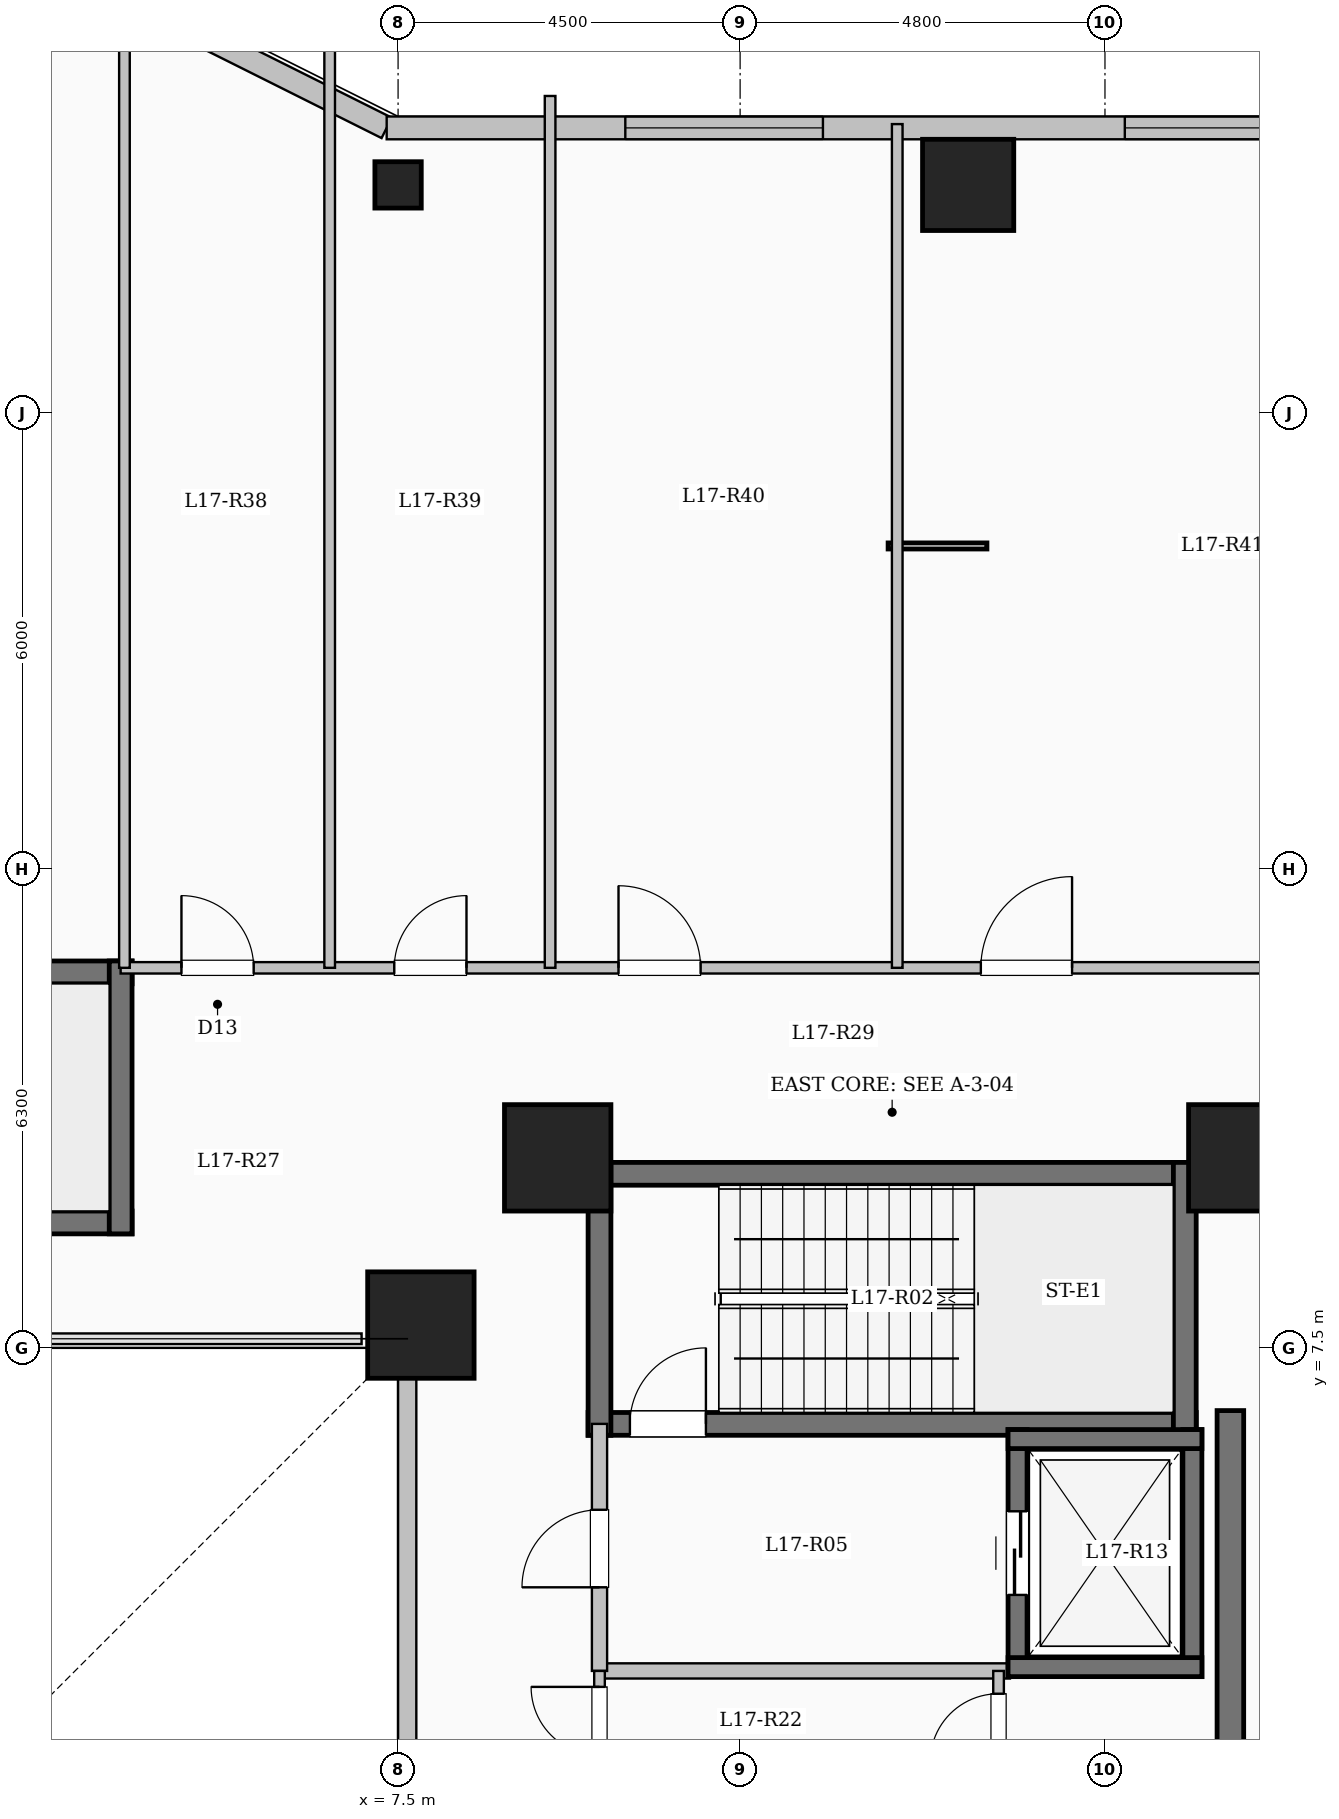
"""IFC4 building model, lengths in metres.
Left out: names, types, materials, properties, quantities, classifications, styles, units other than length and angle.
Written with IfcOpenShell. Run it as: python <this file> out.ifc"""

import sys

from ifc_helpers import new_model, si_unit, direction, frame, frame_2d, origin, origin_2d, place, context, subcontext, project, spatial, rectangle, hollow_circle, extrude, element, fill, save


model = new_model("IFC4")
c1 = context("Model", 3, precision=1e-05, world=origin(), true_north=direction((0.0, 1.0)))
c2 = subcontext(c1, "Body", "Model", "MODEL_VIEW")
j1 = project(units=[si_unit("LENGTHUNIT", "METRE"), si_unit("PLANEANGLEUNIT", "RADIAN")], contexts=[c1])
p1 = place(None, origin())
s1 = spatial("IfcSite", under=j1, at=p1, CompositionType="ELEMENT")
p2 = place(p1, origin())
s2 = spatial("IfcBuilding", under=s1, at=p2, CompositionType="ELEMENT")
p3 = place(p2, frame((0.0, 0.0, 64.2)))
s3 = spatial("IfcBuildingStorey", under=s2, at=p3, CompositionType="ELEMENT", Elevation=64.2)
for number, where, z_axis, x_axis in (
    (1, (7.8, 7.8, 0.0), (0.0, 0.0, 1.0), (1.0, 0.0, 0.0)),
    (2, (9.6, 10.0, 0.0), (0.0, 0.0, 1.0), (1.0, 0.0, 0.0)),
    (3, (18.6, 10.0, 0.0), (0.0, 0.0, 1.0), (1.0, 0.0, 0.0)),
):
    element("IfcColumn", number, at=place(p3, frame(where, z_axis=z_axis, x_axis=x_axis)), inside=s3, PredefinedType="COLUMN", context=c2, shape_type="SweptSolid", body=[
        extrude(rectangle(XDim=1.4, YDim=1.4, at=origin_2d()), origin(), (0.0, 0.0, 1.0), 4.5),
    ])
p4 = place(p3, frame((7.5, 22.8, 0.0), z_axis=(0.0, 0.0, 1.0), x_axis=(1.0, 0.0, 0.0)))
e4 = element("IfcColumn", 4, at=p4, inside=s3, PredefinedType="COLUMN", context=c2, shape_type="SweptSolid", body=[
    extrude(hollow_circle(Radius=0.305, WallThickness=0.025, at=origin_2d()), origin(), (0.0, 0.0, 1.0), 4.5),
])
p5 = place(p3, frame((15.0, 22.8, 0.0), z_axis=(0.0, 0.0, 1.0), x_axis=(1.0, 0.0, 0.0)))
e5 = element("IfcColumn", 5, at=p5, inside=s3, PredefinedType="COLUMN", context=c2, shape_type="SweptSolid", body=[
    extrude(rectangle(XDim=1.2, YDim=1.2, at=origin_2d()), origin(), (0.0, 0.0, 1.0), 4.5),
])
p6 = place(p3, frame((7.62, -7.62, 0.0), z_axis=(0.0, 0.0, 1.0), x_axis=(0.0, 1.0, 0.0)))
e6 = element("IfcWall", 6, at=p6, inside=s3, PredefinedType="SOLIDWALL", context=c2, shape_type="SweptSolid", body=[
    extrude(rectangle(XDim=15.24, YDim=0.24, at=frame_2d((7.62, 0.0))), origin(), (0.0, 0.0, 1.0), 4.2),
])
p7 = place(p6, frame((6.92, 0.0, 0.95)))
e7 = element("IfcOpeningElement", 7, at=p7, cuts=e6, PredefinedType="OPENING", context=c2, shape_type="SweptSolid", body=[
    extrude(rectangle(XDim=1.4, YDim=1.5, at=frame_2d((0.7, 0.75))), frame((0.0, 0.13, 0.0), z_axis=(0.0, -1.0, 0.0), x_axis=(1.0, 0.0, 0.0)), (0.0, 0.0, 1.0), 0.26),
])
p8 = place(p3, frame((4.35, 25.05, 0.0), z_axis=(0.0, 0.0, 1.0), x_axis=(0.894427191, -0.4472135955, 0.0)))
e8 = element("IfcWall", 8, at=p8, inside=s3, PredefinedType="SOLIDWALL", context=c2, shape_type="SweptSolid", body=[
    extrude(rectangle(XDim=3.354, YDim=0.3, at=frame_2d((1.677, 0.0))), origin(), (0.0, 0.0, 1.0), 4.2),
])
p9 = place(p3, frame((7.35, 23.55, 0.0), z_axis=(0.0, 0.0, 1.0), x_axis=(1.0, 0.0, 0.0)))
e9 = element("IfcWall", 9, at=p9, inside=s3, PredefinedType="SOLIDWALL", context=c2, shape_type="SweptSolid", body=[
    extrude(rectangle(XDim=15.3, YDim=0.3, at=frame_2d((7.65, 0.0))), origin(), (0.0, 0.0, 1.0), 4.2),
])
p10 = place(p9, frame((3.139, 0.0, 0.85)))
e10 = element("IfcOpeningElement", 10, at=p10, cuts=e9, PredefinedType="OPENING", context=c2, shape_type="SweptSolid", body=[
    extrude(rectangle(XDim=2.6, YDim=2.4, at=frame_2d((1.3, 1.2))), frame((0.0, 0.16, 0.0), z_axis=(0.0, -1.0, 0.0), x_axis=(1.0, 0.0, 0.0)), (0.0, 0.0, 1.0), 0.32),
])
p11 = place(p9, frame((9.711, 0.0, 0.85)))
e11 = element("IfcOpeningElement", 11, at=p11, cuts=e9, PredefinedType="OPENING", context=c2, shape_type="SweptSolid", body=[
    extrude(rectangle(XDim=2.6, YDim=2.4, at=frame_2d((1.3, 1.2))), frame((0.0, 0.16, 0.0), z_axis=(0.0, -1.0, 0.0), x_axis=(1.0, 0.0, 0.0)), (0.0, 0.0, 1.0), 0.32),
])
p12 = place(p3, frame((10.0, 9.79, 0.0), z_axis=(0.0, 0.0, 1.0), x_axis=(1.0, 0.0, 0.0)))
e12 = element("IfcWall", 12, at=p12, inside=s3, PredefinedType="SHEAR", context=c2, shape_type="SweptSolid", body=[
    extrude(rectangle(XDim=8.0, YDim=0.3, at=frame_2d((4.0, 0.0))), origin(), (0.0, 0.0, 1.0), 4.5),
])
p13 = place(p3, frame((10.0, 6.5, 0.0), z_axis=(0.0, 0.0, 1.0), x_axis=(1.0, 0.0, 0.0)))
e13 = element("IfcWall", 13, at=p13, inside=s3, PredefinedType="SHEAR", context=c2, shape_type="SweptSolid", body=[
    extrude(rectangle(XDim=8.0, YDim=0.3, at=frame_2d((4.0, 0.0))), origin(), (0.0, 0.0, 1.0), 4.5),
])
p14 = place(p13, frame((0.55, 0.0, 0.0)))
e14 = element("IfcOpeningElement", 14, at=p14, cuts=e13, PredefinedType="OPENING", context=c2, shape_type="SweptSolid", body=[
    extrude(rectangle(XDim=1.0, YDim=2.15, at=frame_2d((0.5, 1.075))), frame((0.0, 0.16, 0.0), z_axis=(0.0, -1.0, 0.0), x_axis=(1.0, 0.0, 0.0)), (0.0, 0.0, 1.0), 0.32),
])
for number, where, z_axis, x_axis in (
    (15, (10.15, 6.35, 0.0), (0.0, 0.0, 1.0), (0.0, 1.0, 0.0)),
    (16, (17.85, 6.35, 0.0), (0.0, 0.0, 1.0), (0.0, 1.0, 0.0)),
):
    element("IfcWall", number, at=place(p3, frame(where, z_axis=z_axis, x_axis=x_axis)), inside=s3, PredefinedType="SHEAR", context=c2, shape_type="SweptSolid", body=[
        extrude(rectangle(XDim=3.59, YDim=0.3, at=frame_2d((1.795, 0.0))), origin(), (0.0, 0.0, 1.0), 4.5),
    ])
p15 = place(p3, frame((-4.0, 12.44, 0.0), z_axis=(0.0, 0.0, 1.0), x_axis=(1.0, 0.0, 0.0)))
e17 = element("IfcWall", 17, at=p15, inside=s3, PredefinedType="SHEAR", context=c2, shape_type="SweptSolid", body=[
    extrude(rectangle(XDim=8.0, YDim=0.3, at=frame_2d((4.0, 0.0))), origin(), (0.0, 0.0, 1.0), 4.5),
])
p16 = place(p3, frame((-4.0, 9.15, 0.0), z_axis=(0.0, 0.0, 1.0), x_axis=(1.0, 0.0, 0.0)))
e18 = element("IfcWall", 18, at=p16, inside=s3, PredefinedType="SHEAR", context=c2, shape_type="SweptSolid", body=[
    extrude(rectangle(XDim=8.0, YDim=0.3, at=frame_2d((4.0, 0.0))), origin(), (0.0, 0.0, 1.0), 4.5),
])
p17 = place(p16, frame((0.55, 0.0, 0.0)))
e19 = element("IfcOpeningElement", 19, at=p17, cuts=e18, PredefinedType="OPENING", context=c2, shape_type="SweptSolid", body=[
    extrude(rectangle(XDim=1.0, YDim=2.15, at=frame_2d((0.5, 1.075))), frame((0.0, 0.16, 0.0), z_axis=(0.0, -1.0, 0.0), x_axis=(1.0, 0.0, 0.0)), (0.0, 0.0, 1.0), 0.32),
])
p18 = place(p3, frame((3.85, 9.0, 0.0), z_axis=(0.0, 0.0, 1.0), x_axis=(0.0, 1.0, 0.0)))
e20 = element("IfcWall", 20, at=p18, inside=s3, PredefinedType="SHEAR", context=c2, shape_type="SweptSolid", body=[
    extrude(rectangle(XDim=3.59, YDim=0.3, at=frame_2d((1.795, 0.0))), origin(), (0.0, 0.0, 1.0), 4.5),
])
p19 = place(p3, frame((10.15, 3.25, 0.0), z_axis=(0.0, 0.0, 1.0), x_axis=(1.0, 0.0, 0.0)))
e21 = element("IfcWall", 21, at=p19, inside=s3, PredefinedType="SOLIDWALL", context=c2, shape_type="SweptSolid", body=[
    extrude(rectangle(XDim=5.4, YDim=0.2, at=frame_2d((2.7, 0.0))), origin(), (0.0, 0.0, 1.0), 4.2),
])
p20 = place(p3, frame((10.15, 3.25, 0.0), z_axis=(0.0, 0.0, 1.0), x_axis=(0.0, 1.0, 0.0)))
e22 = element("IfcWall", 22, at=p20, inside=s3, PredefinedType="SOLIDWALL", context=c2, shape_type="SweptSolid", body=[
    extrude(rectangle(XDim=3.25, YDim=0.2, at=frame_2d((1.625, 0.0))), origin(), (0.0, 0.0, 1.0), 4.2),
])
p21 = place(p20, frame((1.1, 0.0, 0.0)))
e23 = element("IfcOpeningElement", 23, at=p21, cuts=e22, PredefinedType="OPENING", context=c2, shape_type="SweptSolid", body=[
    extrude(rectangle(XDim=1.02, YDim=2.15, at=frame_2d((0.51, 1.075))), frame((0.0, 0.11, 0.0), z_axis=(0.0, -1.0, 0.0), x_axis=(1.0, 0.0, 0.0)), (0.0, 0.0, 1.0), 0.22),
])
p22 = place(p3, frame((15.65, 3.175, 0.0), z_axis=(0.0, 0.0, 1.0), x_axis=(0.0, 1.0, 0.0)))
e24 = element("IfcWall", 24, at=p22, inside=s3, PredefinedType="SHEAR", context=c2, shape_type="SweptSolid", body=[
    extrude(rectangle(XDim=3.25, YDim=0.25, at=frame_2d((1.625, 0.0))), origin(), (0.0, 0.0, 1.0), 4.5),
])
p23 = place(p22, frame((1.075, 0.0, 0.0)))
e25 = element("IfcOpeningElement", 25, at=p23, cuts=e24, PredefinedType="OPENING", context=c2, shape_type="SweptSolid", body=[
    extrude(rectangle(XDim=1.1, YDim=2.15, at=frame_2d((0.55, 1.075))), frame((0.0, 0.135, 0.0), z_axis=(0.0, -1.0, 0.0), x_axis=(1.0, 0.0, 0.0)), (0.0, 0.0, 1.0), 0.27),
])
p24 = place(p3, frame((17.95, 3.175, 0.0), z_axis=(0.0, 0.0, 1.0), x_axis=(0.0, 1.0, 0.0)))
e26 = element("IfcWall", 26, at=p24, inside=s3, PredefinedType="SHEAR", context=c2, shape_type="SweptSolid", body=[
    extrude(rectangle(XDim=3.25, YDim=0.25, at=frame_2d((1.625, 0.0))), origin(), (0.0, 0.0, 1.0), 4.5),
])
for number, where, z_axis, x_axis in (
    (27, (15.525, 3.3, 0.0), (0.0, 0.0, 1.0), (1.0, 0.0, 0.0)),
    (28, (15.525, 6.3, 0.0), (0.0, 0.0, 1.0), (1.0, 0.0, 0.0)),
):
    element("IfcWall", number, at=place(p3, frame(where, z_axis=z_axis, x_axis=x_axis)), inside=s3, PredefinedType="SHEAR", context=c2, shape_type="SweptSolid", body=[
        extrude(rectangle(XDim=2.55, YDim=0.25, at=frame_2d((1.275, 0.0))), origin(), (0.0, 0.0, 1.0), 4.5),
    ])
p25 = place(p3, frame((18.45, -7.375, 0.0), z_axis=(0.0, 0.0, 1.0), x_axis=(0.0, 1.0, 0.0)))
e29 = element("IfcWall", 29, at=p25, inside=s3, PredefinedType="SHEAR", context=c2, shape_type="SweptSolid", body=[
    extrude(rectangle(XDim=14.05, YDim=0.35, at=frame_2d((7.025, 0.0))), origin(), (0.0, 0.0, 1.0), 4.5),
])
p26 = place(p3, frame((10.15, 1.92, 0.0), z_axis=(0.0, 0.0, 1.0), x_axis=(0.0, 1.0, 0.0)))
e30 = element("IfcWall", 30, at=p26, inside=s3, PredefinedType="PARTITIONING", context=c2, shape_type="SweptSolid", body=[
    extrude(rectangle(XDim=1.33, YDim=0.14, at=frame_2d((0.665, 0.0))), origin(), (0.0, 0.0, 1.0), 4.2),
])
p27 = place(p26, frame((0.22, 0.0, 0.0)))
e31 = element("IfcOpeningElement", 31, at=p27, cuts=e30, PredefinedType="OPENING", context=c2, shape_type="SweptSolid", body=[
    extrude(rectangle(XDim=0.9, YDim=2.08, at=frame_2d((0.45, 1.04))), frame((0.0, 0.08, 0.0), z_axis=(0.0, -1.0, 0.0), x_axis=(1.0, 0.0, 0.0)), (0.0, 0.0, 1.0), 0.16),
])
p28 = place(p3, frame((15.4, -7.2, 0.0), z_axis=(0.0, 0.0, 1.0), x_axis=(0.0, 1.0, 0.0)))
e32 = element("IfcWall", 32, at=p28, inside=s3, PredefinedType="PARTITIONING", context=c2, shape_type="SweptSolid", body=[
    extrude(rectangle(XDim=10.45, YDim=0.14, at=frame_2d((5.225, 0.0))), origin(), (0.0, 0.0, 1.0), 4.2),
])
p29 = place(p28, frame((9.25, 0.0, 0.0)))
e33 = element("IfcOpeningElement", 33, at=p29, cuts=e32, PredefinedType="OPENING", context=c2, shape_type="SweptSolid", body=[
    extrude(rectangle(XDim=0.9, YDim=2.08, at=frame_2d((0.45, 1.04))), frame((0.0, 0.08, 0.0), z_axis=(0.0, -1.0, 0.0), x_axis=(1.0, 0.0, 0.0)), (0.0, 0.0, 1.0), 0.16),
])
p30 = place(p3, frame((3.85, 12.5, 0.0), z_axis=(0.0, 0.0, 1.0), x_axis=(1.0, 0.0, 0.0)))
e34 = element("IfcWall", 34, at=p30, inside=s3, PredefinedType="PARTITIONING", context=c2, shape_type="SweptSolid", body=[
    extrude(rectangle(XDim=18.7, YDim=0.15, at=frame_2d((9.35, 0.0))), origin(), (0.0, 0.0, 1.0), 4.2),
])
p31 = place(p30, frame((0.8, 0.0, 0.0)))
e35 = element("IfcOpeningElement", 35, at=p31, cuts=e34, PredefinedType="OPENING", context=c2, shape_type="SweptSolid", body=[
    extrude(rectangle(XDim=0.95, YDim=2.15, at=frame_2d((0.475, 1.075))), frame((0.0, 0.085, 0.0), z_axis=(0.0, -1.0, 0.0), x_axis=(1.0, 0.0, 0.0)), (0.0, 0.0, 1.0), 0.17),
])
p32 = place(p30, frame((3.6, 0.0, 0.0)))
e36 = element("IfcOpeningElement", 36, at=p32, cuts=e34, PredefinedType="OPENING", context=c2, shape_type="SweptSolid", body=[
    extrude(rectangle(XDim=0.95, YDim=2.15, at=frame_2d((0.475, 1.075))), frame((0.0, 0.085, 0.0), z_axis=(0.0, -1.0, 0.0), x_axis=(1.0, 0.0, 0.0)), (0.0, 0.0, 1.0), 0.17),
])
p33 = place(p30, frame((6.55, 0.0, 0.0)))
e37 = element("IfcOpeningElement", 37, at=p33, cuts=e34, PredefinedType="OPENING", context=c2, shape_type="SweptSolid", body=[
    extrude(rectangle(XDim=1.08, YDim=2.15, at=frame_2d((0.54, 1.075))), frame((0.0, 0.085, 0.0), z_axis=(0.0, -1.0, 0.0), x_axis=(1.0, 0.0, 0.0)), (0.0, 0.0, 1.0), 0.17),
])
p34 = place(p30, frame((11.317, 0.0, 0.0)))
e38 = element("IfcOpeningElement", 38, at=p34, cuts=e34, PredefinedType="OPENING", context=c2, shape_type="SweptSolid", body=[
    extrude(rectangle(XDim=1.2, YDim=2.15, at=frame_2d((0.6, 1.075))), frame((0.0, 0.085, 0.0), z_axis=(0.0, -1.0, 0.0), x_axis=(1.0, 0.0, 0.0)), (0.0, 0.0, 1.0), 0.17),
])
p35 = place(p3, frame((3.9, 12.5, 0.0), z_axis=(0.0, 0.0, 1.0), x_axis=(0.0, 1.0, 0.0)))
e39 = element("IfcWall", 39, at=p35, inside=s3, PredefinedType="PARTITIONING", context=c2, shape_type="SweptSolid", body=[
    extrude(rectangle(XDim=12.58, YDim=0.14, at=frame_2d((6.29, 0.0))), origin(), (0.0, 0.0, 1.0), 4.2),
])
p36 = place(p3, frame((6.6, 12.5, 0.0), z_axis=(0.0, 0.0, 1.0), x_axis=(0.0, 1.0, 0.0)))
e40 = element("IfcWall", 40, at=p36, inside=s3, PredefinedType="PARTITIONING", context=c2, shape_type="SweptSolid", body=[
    extrude(rectangle(XDim=12.185, YDim=0.14, at=frame_2d((6.093, 0.0))), origin(), (0.0, 0.0, 1.0), 4.2),
])
p37 = place(p3, frame((9.5, 12.5, 0.0), z_axis=(0.0, 0.0, 1.0), x_axis=(0.0, 1.0, 0.0)))
e41 = element("IfcWall", 41, at=p37, inside=s3, PredefinedType="PARTITIONING", context=c2, shape_type="SweptSolid", body=[
    extrude(rectangle(XDim=11.47, YDim=0.14, at=frame_2d((5.735, 0.0))), origin(), (0.0, 0.0, 1.0), 4.2),
])
p38 = place(p3, frame((14.067, 12.5, 0.0), z_axis=(0.0, 0.0, 1.0), x_axis=(0.0, 1.0, 0.0)))
e42 = element("IfcWall", 42, at=p38, inside=s3, PredefinedType="PARTITIONING", context=c2, shape_type="SweptSolid", body=[
    extrude(rectangle(XDim=11.1, YDim=0.14, at=frame_2d((5.55, 0.0))), origin(), (0.0, 0.0, 1.0), 4.2),
])
p39 = place(p10, origin())
e43 = element("IfcWindow", 43, at=p39, inside=s3, PartitioningType="SINGLE_PANEL", PredefinedType="WINDOW", context=c2, shape_type="SweptSolid", body=[
    extrude(rectangle(XDim=2.6, YDim=2.4, at=frame_2d((1.3, 1.2))), frame((0.0, 0.03, 0.0), z_axis=(0.0, -1.0, 0.0), x_axis=(1.0, 0.0, 0.0)), (0.0, 0.0, 1.0), 0.06),
])
fill(e10, e43)
p40 = place(p11, origin())
e44 = element("IfcWindow", 44, at=p40, inside=s3, PartitioningType="SINGLE_PANEL", PredefinedType="WINDOW", context=c2, shape_type="SweptSolid", body=[
    extrude(rectangle(XDim=2.6, YDim=2.4, at=frame_2d((1.3, 1.2))), frame((0.0, 0.03, 0.0), z_axis=(0.0, -1.0, 0.0), x_axis=(1.0, 0.0, 0.0)), (0.0, 0.0, 1.0), 0.06),
])
fill(e11, e44)
p41 = place(p14, origin())
e45 = element("IfcDoor", 45, at=p41, inside=s3, OperationType="SINGLE_SWING_RIGHT", PredefinedType="DOOR", context=c2, shape_type="SweptSolid", body=[
    extrude(rectangle(XDim=1.0, YDim=2.15, at=frame_2d((0.5, 1.075))), frame((0.0, 0.025, 0.0), z_axis=(0.0, -1.0, 0.0), x_axis=(1.0, 0.0, 0.0)), (0.0, 0.0, 1.0), 0.05),
])
fill(e14, e45)
p42 = place(p21, origin())
e46 = element("IfcDoor", 46, at=p42, inside=s3, OperationType="SINGLE_SWING_LEFT", PredefinedType="DOOR", context=c2, shape_type="SweptSolid", body=[
    extrude(rectangle(XDim=1.02, YDim=2.15, at=frame_2d((0.51, 1.075))), frame((0.0, 0.025, 0.0), z_axis=(0.0, -1.0, 0.0), x_axis=(1.0, 0.0, 0.0)), (0.0, 0.0, 1.0), 0.05),
])
fill(e23, e46)
p43 = place(p23, origin())
e47 = element("IfcDoor", 47, at=p43, inside=s3, OperationType="SLIDING_TO_LEFT", PredefinedType="DOOR", context=c2, shape_type="SweptSolid", body=[
    extrude(rectangle(XDim=1.1, YDim=2.15, at=frame_2d((0.55, 1.075))), frame((0.0, 0.025, 0.0), z_axis=(0.0, -1.0, 0.0), x_axis=(1.0, 0.0, 0.0)), (0.0, 0.0, 1.0), 0.05),
])
fill(e25, e47)
p44 = place(p27, origin())
e48 = element("IfcDoor", 48, at=p44, inside=s3, OperationType="SINGLE_SWING_RIGHT", PredefinedType="DOOR", context=c2, shape_type="SweptSolid", body=[
    extrude(rectangle(XDim=0.9, YDim=2.08, at=frame_2d((0.45, 1.04))), frame((0.0, 0.025, 0.0), z_axis=(0.0, -1.0, 0.0), x_axis=(1.0, 0.0, 0.0)), (0.0, 0.0, 1.0), 0.05),
])
fill(e31, e48)
p45 = place(p29, origin())
e49 = element("IfcDoor", 49, at=p45, inside=s3, OperationType="SINGLE_SWING_LEFT", PredefinedType="DOOR", context=c2, shape_type="SweptSolid", body=[
    extrude(rectangle(XDim=0.9, YDim=2.08, at=frame_2d((0.45, 1.04))), frame((0.0, 0.025, 0.0), z_axis=(0.0, -1.0, 0.0), x_axis=(1.0, 0.0, 0.0)), (0.0, 0.0, 1.0), 0.05),
])
fill(e33, e49)
p46 = place(p31, origin())
e50 = element("IfcDoor", 50, at=p46, inside=s3, OperationType="SINGLE_SWING_LEFT", PredefinedType="DOOR", context=c2, shape_type="SweptSolid", body=[
    extrude(rectangle(XDim=0.95, YDim=2.15, at=frame_2d((0.475, 1.075))), frame((0.0, 0.025, 0.0), z_axis=(0.0, -1.0, 0.0), x_axis=(1.0, 0.0, 0.0)), (0.0, 0.0, 1.0), 0.05),
])
fill(e35, e50)
p47 = place(p32, origin())
e51 = element("IfcDoor", 51, at=p47, inside=s3, OperationType="SINGLE_SWING_RIGHT", PredefinedType="DOOR", context=c2, shape_type="SweptSolid", body=[
    extrude(rectangle(XDim=0.95, YDim=2.15, at=frame_2d((0.475, 1.075))), frame((0.0, 0.025, 0.0), z_axis=(0.0, -1.0, 0.0), x_axis=(1.0, 0.0, 0.0)), (0.0, 0.0, 1.0), 0.05),
])
fill(e36, e51)
p48 = place(p33, origin())
e52 = element("IfcDoor", 52, at=p48, inside=s3, OperationType="SINGLE_SWING_LEFT", PredefinedType="DOOR", context=c2, shape_type="SweptSolid", body=[
    extrude(rectangle(XDim=1.08, YDim=2.15, at=frame_2d((0.54, 1.075))), frame((0.0, 0.025, 0.0), z_axis=(0.0, -1.0, 0.0), x_axis=(1.0, 0.0, 0.0)), (0.0, 0.0, 1.0), 0.05),
])
fill(e37, e52)
p49 = place(p34, origin())
e53 = element("IfcDoor", 53, at=p49, inside=s3, OperationType="SINGLE_SWING_RIGHT", PredefinedType="DOOR", context=c2, shape_type="SweptSolid", body=[
    extrude(rectangle(XDim=1.2, YDim=2.15, at=frame_2d((0.6, 1.075))), frame((0.0, 0.025, 0.0), z_axis=(0.0, -1.0, 0.0), x_axis=(1.0, 0.0, 0.0)), (0.0, 0.0, 1.0), 0.05),
])
fill(e38, e53)
save(model, sys.argv[1])
